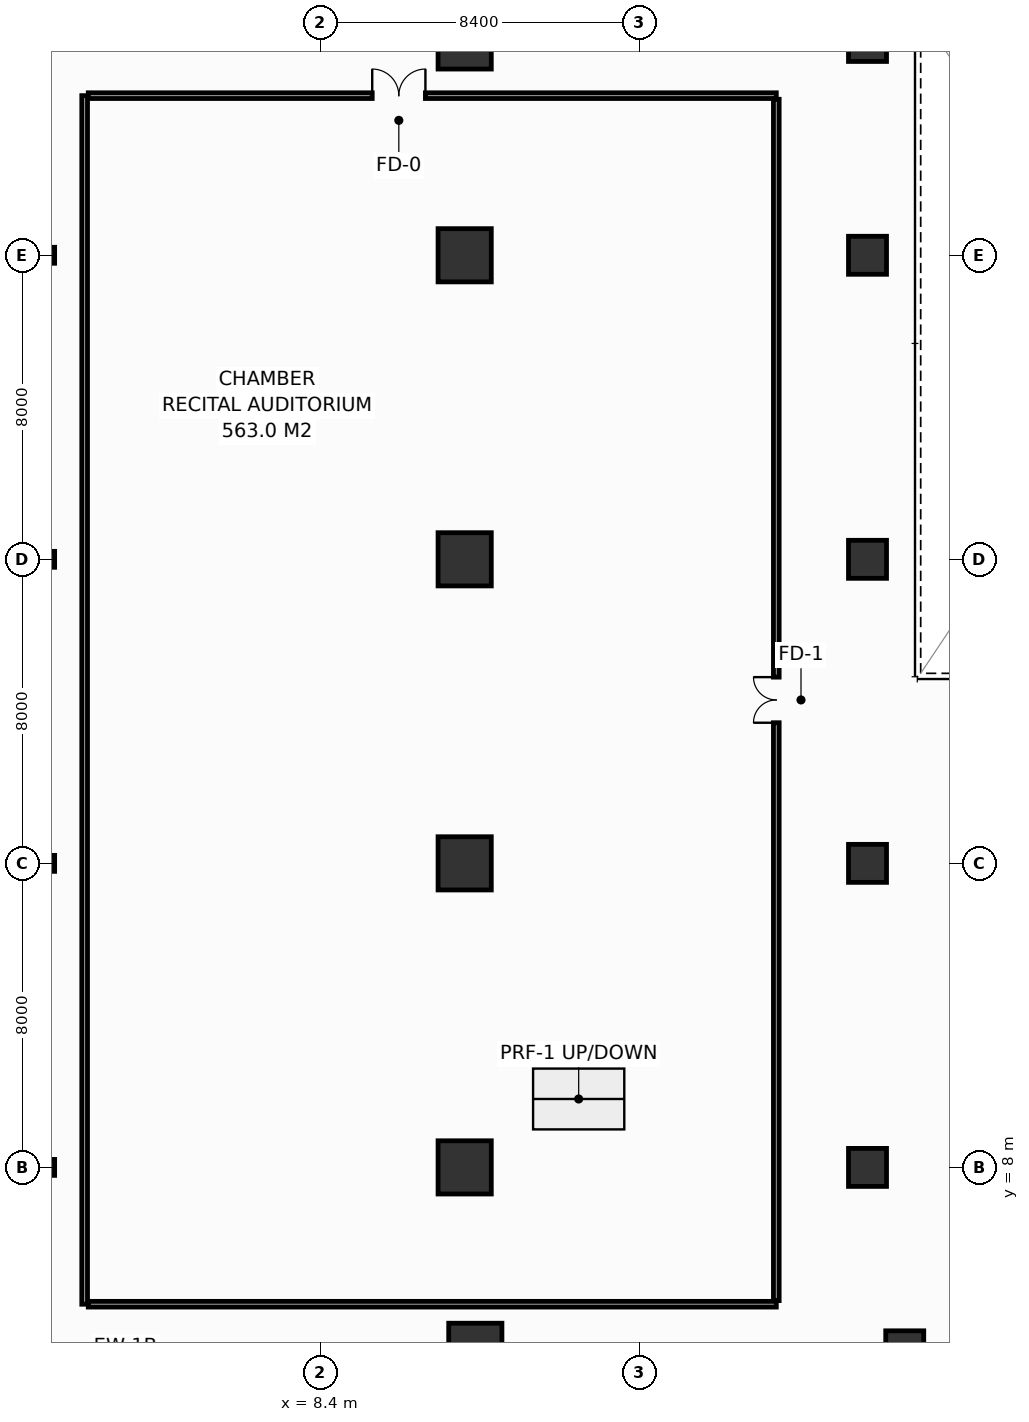
"""IFC4 building model, lengths in metres.
Left out: names, types, materials, properties, quantities, classifications, styles, units other than length and angle.
Written with IfcOpenShell. Run it as: python <this file> out.ifc"""

import sys

from ifc_helpers import new_model, si_unit, direction, frame, frame_2d, origin, origin_2d, place, context, subcontext, project, spatial, rectangle, hollow_rectangle, i_section, extrude, element, fill, save


model = new_model("IFC4")
c1 = context("Model", 3, precision=1e-05, world=origin(), true_north=direction((0.0, 1.0)))
c2 = subcontext(c1, "Body", "Model", "MODEL_VIEW")
j1 = project(units=[si_unit("LENGTHUNIT", "METRE"), si_unit("PLANEANGLEUNIT", "RADIAN")], contexts=[c1])
p1 = place(None, origin())
s1 = spatial("IfcSite", under=j1, at=p1, CompositionType="ELEMENT")
p2 = place(p1, origin())
s2 = spatial("IfcBuilding", under=s1, at=p2, CompositionType="ELEMENT")
p3 = place(p2, frame((0.0, 0.0, 6.0)))
s3 = spatial("IfcBuildingStorey", under=s2, at=p3, CompositionType="ELEMENT", Elevation=6.0)
p4 = place(p3, frame((12.48, 3.2, 0.0), z_axis=(0.0, 0.0, 1.0), x_axis=(1.0, 0.0, 0.0)))
e1 = element("IfcColumn", 1, at=p4, inside=s3, PredefinedType="COLUMN", context=c2, shape_type="SweptSolid", body=[
    extrude(hollow_rectangle(XDim=1.4, YDim=1.4, WallThickness=0.065, at=origin_2d()), origin(), (0.0, 0.0, 1.0), 5.4),
])
p5 = place(p3, frame((23.78, 3.2, 0.0), z_axis=(0.0, 0.0, 1.0), x_axis=(1.0, 0.0, 0.0)))
e2 = element("IfcColumn", 2, at=p5, inside=s3, PredefinedType="COLUMN", context=c2, shape_type="SweptSolid", body=[
    extrude(hollow_rectangle(XDim=1.0, YDim=1.0, WallThickness=0.045, at=origin_2d()), origin(), (0.0, 0.0, 1.0), 5.4),
])
p6 = place(p3, frame((12.2, 8.0, 0.0), z_axis=(0.0, 0.0, 1.0), x_axis=(1.0, 0.0, 0.0)))
e3 = element("IfcColumn", 3, at=p6, inside=s3, PredefinedType="COLUMN", context=c2, shape_type="SweptSolid", body=[
    extrude(hollow_rectangle(XDim=1.4, YDim=1.4, WallThickness=0.065, at=origin_2d()), origin(), (0.0, 0.0, 1.0), 5.4),
])
p7 = place(p3, frame((22.8, 8.0, 0.0), z_axis=(0.0, 0.0, 1.0), x_axis=(1.0, 0.0, 0.0)))
e4 = element("IfcColumn", 4, at=p7, inside=s3, PredefinedType="COLUMN", context=c2, shape_type="SweptSolid", body=[
    extrude(hollow_rectangle(XDim=1.0, YDim=1.0, WallThickness=0.045, at=origin_2d()), origin(), (0.0, 0.0, 1.0), 5.4),
])
p8 = place(p3, frame((12.2, 16.0, 0.0), z_axis=(0.0, 0.0, 1.0), x_axis=(1.0, 0.0, 0.0)))
e5 = element("IfcColumn", 5, at=p8, inside=s3, PredefinedType="COLUMN", context=c2, shape_type="SweptSolid", body=[
    extrude(hollow_rectangle(XDim=1.4, YDim=1.4, WallThickness=0.065, at=origin_2d()), origin(), (0.0, 0.0, 1.0), 5.4),
])
p9 = place(p3, frame((22.8, 16.0, 0.0), z_axis=(0.0, 0.0, 1.0), x_axis=(1.0, 0.0, 0.0)))
e6 = element("IfcColumn", 6, at=p9, inside=s3, PredefinedType="COLUMN", context=c2, shape_type="SweptSolid", body=[
    extrude(hollow_rectangle(XDim=1.0, YDim=1.0, WallThickness=0.045, at=origin_2d()), origin(), (0.0, 0.0, 1.0), 5.4),
])
p10 = place(p3, frame((12.2, 24.0, 0.0), z_axis=(0.0, 0.0, 1.0), x_axis=(1.0, 0.0, 0.0)))
e7 = element("IfcColumn", 7, at=p10, inside=s3, PredefinedType="COLUMN", context=c2, shape_type="SweptSolid", body=[
    extrude(hollow_rectangle(XDim=1.4, YDim=1.4, WallThickness=0.065, at=origin_2d()), origin(), (0.0, 0.0, 1.0), 5.4),
])
p11 = place(p3, frame((22.8, 24.0, 0.0), z_axis=(0.0, 0.0, 1.0), x_axis=(1.0, 0.0, 0.0)))
e8 = element("IfcColumn", 8, at=p11, inside=s3, PredefinedType="COLUMN", context=c2, shape_type="SweptSolid", body=[
    extrude(hollow_rectangle(XDim=1.0, YDim=1.0, WallThickness=0.045, at=origin_2d()), origin(), (0.0, 0.0, 1.0), 5.4),
])
p12 = place(p3, frame((12.2, 32.0, 0.0), z_axis=(0.0, 0.0, 1.0), x_axis=(1.0, 0.0, 0.0)))
e9 = element("IfcColumn", 9, at=p12, inside=s3, PredefinedType="COLUMN", context=c2, shape_type="SweptSolid", body=[
    extrude(hollow_rectangle(XDim=1.4, YDim=1.4, WallThickness=0.065, at=origin_2d()), origin(), (0.0, 0.0, 1.0), 5.4),
])
p13 = place(p3, frame((22.8, 32.0, 0.0), z_axis=(0.0, 0.0, 1.0), x_axis=(1.0, 0.0, 0.0)))
e10 = element("IfcColumn", 10, at=p13, inside=s3, PredefinedType="COLUMN", context=c2, shape_type="SweptSolid", body=[
    extrude(hollow_rectangle(XDim=1.0, YDim=1.0, WallThickness=0.045, at=origin_2d()), origin(), (0.0, 0.0, 1.0), 5.4),
])
p14 = place(p3, frame((12.2, 37.6, 0.0), z_axis=(0.0, 0.0, 1.0), x_axis=(1.0, 0.0, 0.0)))
e11 = element("IfcColumn", 11, at=p14, inside=s3, PredefinedType="COLUMN", context=c2, shape_type="SweptSolid", body=[
    extrude(hollow_rectangle(XDim=1.4, YDim=1.4, WallThickness=0.065, at=origin_2d()), origin(), (0.0, 0.0, 1.0), 5.4),
])
p15 = place(p3, frame((22.8, 37.6, 0.0), z_axis=(0.0, 0.0, 1.0), x_axis=(1.0, 0.0, 0.0)))
e12 = element("IfcColumn", 12, at=p15, inside=s3, PredefinedType="COLUMN", context=c2, shape_type="SweptSolid", body=[
    extrude(hollow_rectangle(XDim=1.0, YDim=1.0, WallThickness=0.045, at=origin_2d()), origin(), (0.0, 0.0, 1.0), 5.4),
])
for number, where, z_axis, x_axis in (
    (13, (1.2, 8.0, 0.0), (0.0, 0.0, 1.0), (1.0, 0.0, 0.0)),
    (14, (1.2, 16.0, 0.0), (0.0, 0.0, 1.0), (1.0, 0.0, 0.0)),
    (15, (1.2, 24.0, 0.0), (0.0, 0.0, 1.0), (1.0, 0.0, 0.0)),
    (16, (1.2, 32.0, 0.0), (0.0, 0.0, 1.0), (1.0, 0.0, 0.0)),
):
    element("IfcColumn", number, at=place(p3, frame(where, z_axis=z_axis, x_axis=x_axis)), inside=s3, PredefinedType="COLUMN", context=c2, shape_type="SweptSolid", body=[
        extrude(i_section(OverallWidth=0.42, OverallDepth=0.42, WebThickness=0.02, FlangeThickness=0.035, FilletRadius=0.022, at=origin_2d()), origin(), (0.0, 0.0, 1.0), 5.4),
    ])
p16 = place(p3, frame((2.2, 4.4, 0.0), z_axis=(0.0, 0.0, 1.0), x_axis=(0.0, 1.0, 0.0)))
e17 = element("IfcWall", 17, at=p16, inside=s3, PredefinedType="PARTITIONING", context=c2, shape_type="SweptSolid", body=[
    extrude(rectangle(XDim=31.8, YDim=0.15, at=frame_2d((15.9, 0.0))), origin(), (0.0, 0.0, 1.0), 4.185),
])
p17 = place(p3, frame((2.295, 4.4, 0.0), z_axis=(0.0, 0.0, 1.0), x_axis=(1.0, 0.0, 0.0)))
e18 = element("IfcWall", 18, at=p17, inside=s3, PredefinedType="PARTITIONING", context=c2, shape_type="SweptSolid", body=[
    extrude(rectangle(XDim=18.105, YDim=0.15, at=frame_2d((9.052, 0.0))), origin(), (0.0, 0.0, 1.0), 4.185),
])
p18 = place(p3, frame((2.295, 36.2, 0.0), z_axis=(0.0, 0.0, 1.0), x_axis=(1.0, 0.0, 0.0)))
e19 = element("IfcWall", 19, at=p18, inside=s3, PredefinedType="PARTITIONING", context=c2, shape_type="SweptSolid", body=[
    extrude(rectangle(XDim=18.105, YDim=0.15, at=frame_2d((9.052, 0.0))), origin(), (0.0, 0.0, 1.0), 4.185),
])
p19 = place(p18, frame((7.472, 0.0, 0.0)))
e20 = element("IfcOpeningElement", 20, at=p19, cuts=e19, PredefinedType="OPENING", context=c2, shape_type="SweptSolid", body=[
    extrude(rectangle(XDim=1.4, YDim=2.2, at=frame_2d((0.7, 1.1))), frame((0.0, 0.085, 0.0), z_axis=(0.0, -1.0, 0.0), x_axis=(1.0, 0.0, 0.0)), (0.0, 0.0, 1.0), 0.17),
])
p20 = place(p3, frame((20.4, 4.495, 0.0), z_axis=(0.0, 0.0, 1.0), x_axis=(0.0, 1.0, 0.0)))
e21 = element("IfcWall", 21, at=p20, inside=s3, PredefinedType="PARTITIONING", context=c2, shape_type="SweptSolid", body=[
    extrude(rectangle(XDim=31.61, YDim=0.15, at=frame_2d((15.805, 0.0))), origin(), (0.0, 0.0, 1.0), 4.185),
])
p21 = place(p20, frame((15.205, 0.0, 0.0)))
e22 = element("IfcOpeningElement", 22, at=p21, cuts=e21, PredefinedType="OPENING", context=c2, shape_type="SweptSolid", body=[
    extrude(rectangle(XDim=1.2, YDim=2.15, at=frame_2d((0.6, 1.075))), frame((0.0, 0.085, 0.0), z_axis=(0.0, -1.0, 0.0), x_axis=(1.0, 0.0, 0.0)), (0.0, 0.0, 1.0), 0.17),
])
p22 = place(p19, origin())
e23 = element("IfcDoor", 23, at=p22, inside=s3, OperationType="DOUBLE_DOOR_SINGLE_SWING", PredefinedType="DOOR", context=c2, shape_type="SweptSolid", body=[
    extrude(rectangle(XDim=1.4, YDim=2.2, at=frame_2d((0.7, 1.1))), frame((0.0, 0.025, 0.0), z_axis=(0.0, -1.0, 0.0), x_axis=(1.0, 0.0, 0.0)), (0.0, 0.0, 1.0), 0.05),
])
fill(e20, e23)
p23 = place(p21, origin())
e24 = element("IfcDoor", 24, at=p23, inside=s3, OperationType="DOUBLE_DOOR_SINGLE_SWING", PredefinedType="DOOR", context=c2, shape_type="SweptSolid", body=[
    extrude(rectangle(XDim=1.2, YDim=2.15, at=frame_2d((0.6, 1.075))), frame((0.0, 0.025, 0.0), z_axis=(0.0, -1.0, 0.0), x_axis=(1.0, 0.0, 0.0)), (0.0, 0.0, 1.0), 0.05),
])
fill(e22, e24)
save(model, sys.argv[1])
